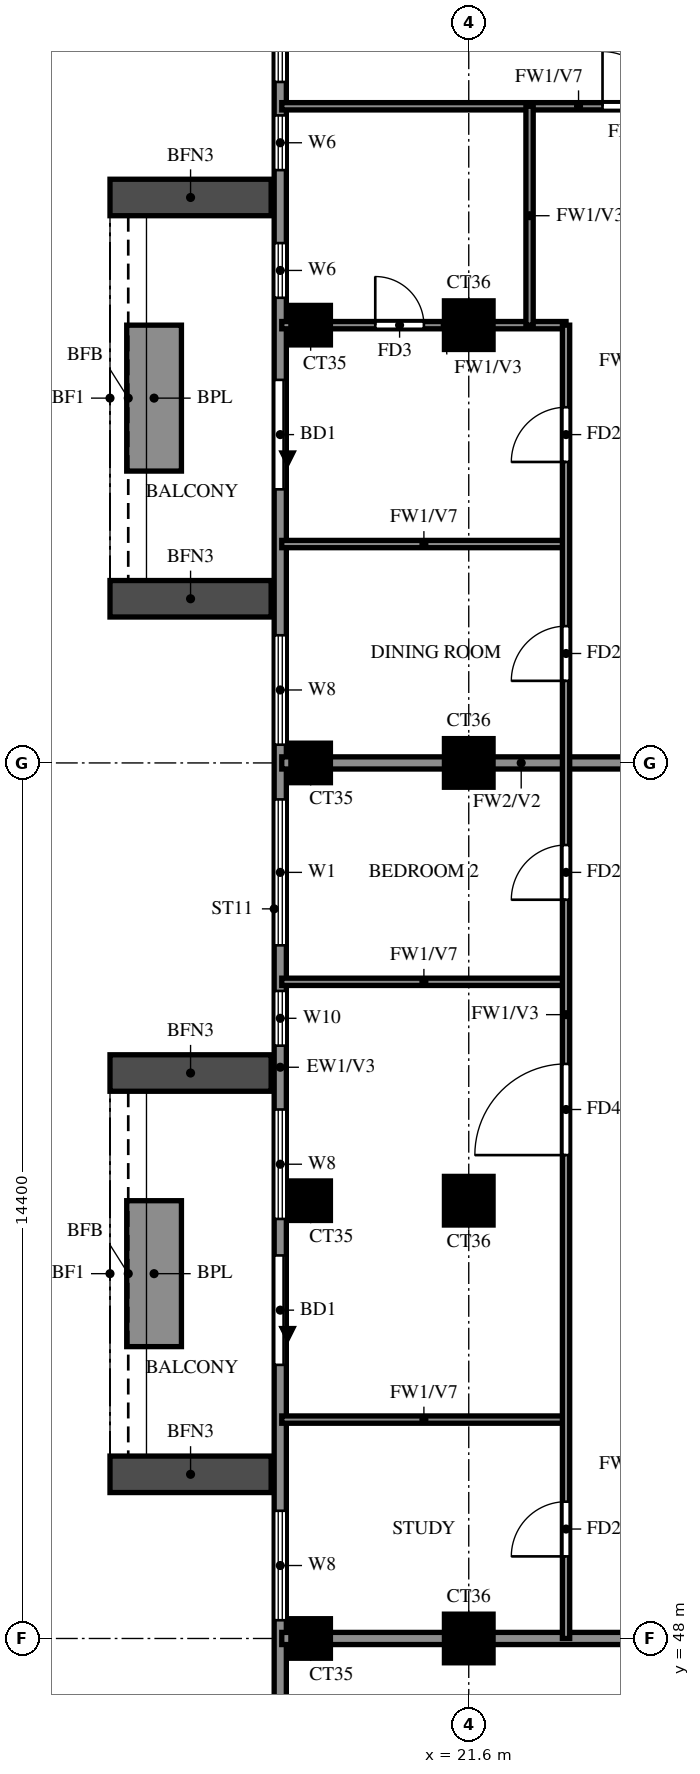
"""IFC4 building model, lengths in metres.
Left out: names, types, materials, properties, quantities, classifications, styles, units other than length and angle.
Written with IfcOpenShell. Run it as: python <this file> out.ifc"""

import sys

from ifc_helpers import new_model, si_unit, direction, frame, frame_2d, origin, origin_2d, place, context, subcontext, project, spatial, rectangle, extrude, source, transform, mapped, element, fill, save


model = new_model("IFC4")
c1 = context("Model", 3, precision=1e-05, world=origin(), true_north=direction((0.0, 1.0)))
c2 = subcontext(c1, "Body", "Model", "MODEL_VIEW")
j1 = project(units=[si_unit("LENGTHUNIT", "METRE"), si_unit("PLANEANGLEUNIT", "RADIAN")], contexts=[c1])
p1 = place(None, origin())
s1 = spatial("IfcSite", under=j1, at=p1, CompositionType="ELEMENT")
p2 = place(p1, origin())
s2 = spatial("IfcBuilding", under=s1, at=p2, CompositionType="ELEMENT")
p3 = place(p2, frame((0.0, 0.0, 243.0)))
s3 = spatial("IfcBuildingStorey", under=s2, at=p3, CompositionType="ELEMENT", Elevation=243.0)
m1 = source(origin(), c2, "Body", "SweptSolid", [
    extrude(rectangle(XDim=0.65, YDim=0.65, at=origin_2d()), origin(), (0.0, 0.0, 1.0), 3.22),
])
p4 = place(p3, frame((19.0, 48.0, 0.0), z_axis=(0.0, 0.0, 1.0), x_axis=(1.0, 0.0, 0.0)))
e1 = element("IfcColumn", 1, at=p4, inside=s3, PredefinedType="COLUMN", context=c2, shape_type="MappedRepresentation", body=[
    mapped(m1, transform((0.0, 0.0, 0.0))),
])
m2 = source(origin(), c2, "Body", "SweptSolid", [
    extrude(rectangle(XDim=0.8, YDim=0.8, at=origin_2d()), origin(), (0.0, 0.0, 1.0), 3.22),
])
p5 = place(p3, frame((21.6, 48.0, 0.0), z_axis=(0.0, 0.0, 1.0), x_axis=(1.0, 0.0, 0.0)))
e2 = element("IfcColumn", 2, at=p5, inside=s3, PredefinedType="COLUMN", context=c2, shape_type="MappedRepresentation", body=[
    mapped(m2, transform((0.0, 0.0, 0.0))),
])
p6 = place(p3, frame((19.0, 55.2, 0.0), z_axis=(0.0, 0.0, 1.0), x_axis=(1.0, 0.0, 0.0)))
e3 = element("IfcColumn", 3, at=p6, inside=s3, PredefinedType="COLUMN", context=c2, shape_type="MappedRepresentation", body=[
    mapped(m1, transform((0.0, 0.0, 0.0))),
])
p7 = place(p3, frame((21.6, 55.2, 0.0), z_axis=(0.0, 0.0, 1.0), x_axis=(1.0, 0.0, 0.0)))
e4 = element("IfcColumn", 4, at=p7, inside=s3, PredefinedType="COLUMN", context=c2, shape_type="MappedRepresentation", body=[
    mapped(m2, transform((0.0, 0.0, 0.0))),
])
p8 = place(p3, frame((19.0, 62.4, 0.0), z_axis=(0.0, 0.0, 1.0), x_axis=(1.0, 0.0, 0.0)))
e5 = element("IfcColumn", 5, at=p8, inside=s3, PredefinedType="COLUMN", context=c2, shape_type="MappedRepresentation", body=[
    mapped(m1, transform((0.0, 0.0, 0.0))),
])
p9 = place(p3, frame((21.6, 62.4, 0.0), z_axis=(0.0, 0.0, 1.0), x_axis=(1.0, 0.0, 0.0)))
e6 = element("IfcColumn", 6, at=p9, inside=s3, PredefinedType="COLUMN", context=c2, shape_type="MappedRepresentation", body=[
    mapped(m2, transform((0.0, 0.0, 0.0))),
])
p10 = place(p3, frame((19.0, 69.6, 0.0), z_axis=(0.0, 0.0, 1.0), x_axis=(1.0, 0.0, 0.0)))
e7 = element("IfcColumn", 7, at=p10, inside=s3, PredefinedType="COLUMN", context=c2, shape_type="MappedRepresentation", body=[
    mapped(m1, transform((0.0, 0.0, 0.0))),
])
p11 = place(p3, frame((21.6, 69.6, 0.0), z_axis=(0.0, 0.0, 1.0), x_axis=(1.0, 0.0, 0.0)))
e8 = element("IfcColumn", 8, at=p11, inside=s3, PredefinedType="COLUMN", context=c2, shape_type="MappedRepresentation", body=[
    mapped(m2, transform((0.0, 0.0, 0.0))),
])
p12 = place(p3, frame((18.5, 76.6, 0.0), z_axis=(0.0, 0.0, 1.0), x_axis=(0.0, -1.0, 0.0)))
e9 = element("IfcWall", 9, at=p12, inside=s3, PredefinedType="SOLIDWALL", context=c2, shape_type="SweptSolid", body=[
    extrude(rectangle(XDim=33.4, YDim=0.2, at=frame_2d((16.7, 0.0))), origin(), (0.0, 0.0, 1.0), 3.22),
])
p13 = place(p12, frame((7.9, 0.0, 0.0)))
e10 = element("IfcOpeningElement", 10, at=p13, cuts=e9, PredefinedType="OPENING", context=c2, shape_type="SweptSolid", body=[
    extrude(rectangle(XDim=1.8, YDim=2.4, at=frame_2d((0.9, 1.2))), frame((0.0, 0.11, 0.0), z_axis=(0.0, -1.0, 0.0), x_axis=(1.0, 0.0, 0.0)), (0.0, 0.0, 1.0), 0.22),
])
p14 = place(p12, frame((22.3, 0.0, 0.0)))
e11 = element("IfcOpeningElement", 11, at=p14, cuts=e9, PredefinedType="OPENING", context=c2, shape_type="SweptSolid", body=[
    extrude(rectangle(XDim=1.8, YDim=2.4, at=frame_2d((0.9, 1.2))), frame((0.0, 0.11, 0.0), z_axis=(0.0, -1.0, 0.0), x_axis=(1.0, 0.0, 0.0)), (0.0, 0.0, 1.0), 0.22),
])
p15 = place(p12, frame((29.7, 0.0, 0.6)))
e12 = element("IfcOpeningElement", 12, at=p15, cuts=e9, PredefinedType="OPENING", context=c2, shape_type="SweptSolid", body=[
    extrude(rectangle(XDim=2.4, YDim=2.4, at=frame_2d((1.2, 1.2))), frame((0.0, 0.11, 0.0), z_axis=(0.0, -1.0, 0.0), x_axis=(1.0, 0.0, 0.0)), (0.0, 0.0, 1.0), 0.22),
])
p16 = place(p12, frame((26.5, 0.0, 0.6)))
e13 = element("IfcOpeningElement", 13, at=p16, cuts=e9, PredefinedType="OPENING", context=c2, shape_type="SweptSolid", body=[
    extrude(rectangle(XDim=1.8, YDim=2.4, at=frame_2d((0.9, 1.2))), frame((0.0, 0.11, 0.0), z_axis=(0.0, -1.0, 0.0), x_axis=(1.0, 0.0, 0.0)), (0.0, 0.0, 1.0), 0.22),
])
p17 = place(p12, frame((17.95, 0.0, 0.6)))
e14 = element("IfcOpeningElement", 14, at=p17, cuts=e9, PredefinedType="OPENING", context=c2, shape_type="SweptSolid", body=[
    extrude(rectangle(XDim=0.9, YDim=2.4, at=frame_2d((0.45, 1.2))), frame((0.0, 0.11, 0.0), z_axis=(0.0, -1.0, 0.0), x_axis=(1.0, 0.0, 0.0)), (0.0, 0.0, 1.0), 0.22),
])
p18 = place(p12, frame((19.9, 0.0, 0.6)))
e15 = element("IfcOpeningElement", 15, at=p18, cuts=e9, PredefinedType="OPENING", context=c2, shape_type="SweptSolid", body=[
    extrude(rectangle(XDim=1.8, YDim=2.4, at=frame_2d((0.9, 1.2))), frame((0.0, 0.11, 0.0), z_axis=(0.0, -1.0, 0.0), x_axis=(1.0, 0.0, 0.0)), (0.0, 0.0, 1.0), 0.22),
])
p19 = place(p12, frame((14.8, 0.0, 0.6)))
e16 = element("IfcOpeningElement", 16, at=p19, cuts=e9, PredefinedType="OPENING", context=c2, shape_type="SweptSolid", body=[
    extrude(rectangle(XDim=2.4, YDim=2.4, at=frame_2d((1.2, 1.2))), frame((0.0, 0.11, 0.0), z_axis=(0.0, -1.0, 0.0), x_axis=(1.0, 0.0, 0.0)), (0.0, 0.0, 1.0), 0.22),
])
p20 = place(p12, frame((12.1, 0.0, 0.6)))
e17 = element("IfcOpeningElement", 17, at=p20, cuts=e9, PredefinedType="OPENING", context=c2, shape_type="SweptSolid", body=[
    extrude(rectangle(XDim=1.8, YDim=2.4, at=frame_2d((0.9, 1.2))), frame((0.0, 0.11, 0.0), z_axis=(0.0, -1.0, 0.0), x_axis=(1.0, 0.0, 0.0)), (0.0, 0.0, 1.0), 0.22),
])
p21 = place(p12, frame((3.55, 0.0, 1.5)))
e18 = element("IfcOpeningElement", 18, at=p21, cuts=e9, PredefinedType="OPENING", context=c2, shape_type="SweptSolid", body=[
    extrude(rectangle(XDim=0.9, YDim=0.9, at=frame_2d((0.45, 0.45))), frame((0.0, 0.11, 0.0), z_axis=(0.0, -1.0, 0.0), x_axis=(1.0, 0.0, 0.0)), (0.0, 0.0, 1.0), 0.22),
])
p22 = place(p12, frame((5.65, 0.0, 1.5)))
e19 = element("IfcOpeningElement", 19, at=p22, cuts=e9, PredefinedType="OPENING", context=c2, shape_type="SweptSolid", body=[
    extrude(rectangle(XDim=0.9, YDim=0.9, at=frame_2d((0.45, 0.45))), frame((0.0, 0.11, 0.0), z_axis=(0.0, -1.0, 0.0), x_axis=(1.0, 0.0, 0.0)), (0.0, 0.0, 1.0), 0.22),
])
p23 = place(p12, frame((0.6, 0.0, 0.6)))
e20 = element("IfcOpeningElement", 20, at=p23, cuts=e9, PredefinedType="OPENING", context=c2, shape_type="SweptSolid", body=[
    extrude(rectangle(XDim=2.4, YDim=2.4, at=frame_2d((1.2, 1.2))), frame((0.0, 0.11, 0.0), z_axis=(0.0, -1.0, 0.0), x_axis=(1.0, 0.0, 0.0)), (0.0, 0.0, 1.0), 0.22),
])
for number, where, z_axis, x_axis in (
    (21, (18.35, 71.7, 0.0), (0.0, 0.0, 1.0), (-1.0, 0.0, 0.0)),
    (22, (18.35, 65.1, 0.0), (0.0, 0.0, 1.0), (-1.0, 0.0, 0.0)),
):
    element("IfcWall", number, at=place(p3, frame(where, z_axis=z_axis, x_axis=x_axis)), inside=s3, PredefinedType="SOLIDWALL", context=c2, shape_type="SweptSolid", body=[
        extrude(rectangle(XDim=2.65, YDim=0.6, at=frame_2d((1.325, 0.0))), origin(), (0.0, 0.0, 1.0), 2.85),
    ])
p24 = place(p3, frame((16.425, 69.6, 0.0), z_axis=(0.0, 0.0, 1.0), x_axis=(0.0, -1.0, 0.0)))
e23 = element("IfcWall", 23, at=p24, inside=s3, PredefinedType="SOLIDWALL", context=c2, shape_type="SweptSolid", body=[
    extrude(rectangle(XDim=2.4, YDim=0.9, at=frame_2d((1.2, 0.0))), origin(), (0.0, 0.0, 1.0), 0.9),
])
for number, where, z_axis, x_axis in (
    (24, (18.35, 57.3, 0.0), (0.0, 0.0, 1.0), (-1.0, 0.0, 0.0)),
    (25, (18.35, 50.7, 0.0), (0.0, 0.0, 1.0), (-1.0, 0.0, 0.0)),
):
    element("IfcWall", number, at=place(p3, frame(where, z_axis=z_axis, x_axis=x_axis)), inside=s3, PredefinedType="SOLIDWALL", context=c2, shape_type="SweptSolid", body=[
        extrude(rectangle(XDim=2.65, YDim=0.6, at=frame_2d((1.325, 0.0))), origin(), (0.0, 0.0, 1.0), 2.85),
    ])
p25 = place(p3, frame((16.425, 55.2, 0.0), z_axis=(0.0, 0.0, 1.0), x_axis=(0.0, -1.0, 0.0)))
e26 = element("IfcWall", 26, at=p25, inside=s3, PredefinedType="SOLIDWALL", context=c2, shape_type="SweptSolid", body=[
    extrude(rectangle(XDim=2.4, YDim=0.9, at=frame_2d((1.2, 0.0))), origin(), (0.0, 0.0, 1.0), 0.9),
])
p26 = place(p3, frame((18.525, 48.0, 0.0), z_axis=(0.0, 0.0, 1.0), x_axis=(1.0, 0.0, 0.0)))
e27 = element("IfcWall", 27, at=p26, inside=s3, PredefinedType="SOLIDWALL", context=c2, shape_type="SweptSolid", body=[
    extrude(rectangle(XDim=15.075, YDim=0.2, at=frame_2d((7.538, 0.0))), origin(), (0.0, 0.0, 1.0), 3.22),
])
p27 = place(p3, frame((18.525, 62.4, 0.0), z_axis=(0.0, 0.0, 1.0), x_axis=(1.0, 0.0, 0.0)))
e28 = element("IfcWall", 28, at=p27, inside=s3, PredefinedType="SOLIDWALL", context=c2, shape_type="SweptSolid", body=[
    extrude(rectangle(XDim=7.875, YDim=0.2, at=frame_2d((3.938, 0.0))), origin(), (0.0, 0.0, 1.0), 3.22),
])
for number, where, z_axis, x_axis in (
    (29, (18.525, 51.6, 0.0), (0.0, 0.0, 1.0), (1.0, 0.0, 0.0)),
    (30, (18.525, 58.8, 0.0), (0.0, 0.0, 1.0), (1.0, 0.0, 0.0)),
    (31, (18.525, 66.0, 0.0), (0.0, 0.0, 1.0), (1.0, 0.0, 0.0)),
):
    element("IfcWall", number, at=place(p3, frame(where, z_axis=z_axis, x_axis=x_axis)), inside=s3, PredefinedType="PARTITIONING", context=c2, shape_type="SweptSolid", body=[
        extrude(rectangle(XDim=4.675, YDim=0.12, at=frame_2d((2.337, 0.0))), origin(), (0.0, 0.0, 1.0), 2.32),
    ])
p28 = place(p3, frame((18.525, 69.6, 0.0), z_axis=(0.0, 0.0, 1.0), x_axis=(1.0, 0.0, 0.0)))
e32 = element("IfcWall", 32, at=p28, inside=s3, PredefinedType="PARTITIONING", context=c2, shape_type="SweptSolid", body=[
    extrude(rectangle(XDim=4.675, YDim=0.12, at=frame_2d((2.337, 0.0))), origin(), (0.0, 0.0, 1.0), 3.22),
])
p29 = place(p28, frame((1.538, 0.0, 0.0)))
e33 = element("IfcOpeningElement", 33, at=p29, cuts=e32, PredefinedType="OPENING", context=c2, shape_type="SweptSolid", body=[
    extrude(rectangle(XDim=0.8, YDim=2.1, at=frame_2d((0.4, 1.05))), frame((0.0, 0.07, 0.0), z_axis=(0.0, -1.0, 0.0), x_axis=(1.0, 0.0, 0.0)), (0.0, 0.0, 1.0), 0.14),
])
p30 = place(p3, frame((18.525, 73.2, 0.0), z_axis=(0.0, 0.0, 1.0), x_axis=(1.0, 0.0, 0.0)))
e34 = element("IfcWall", 34, at=p30, inside=s3, PredefinedType="PARTITIONING", context=c2, shape_type="SweptSolid", body=[
    extrude(rectangle(XDim=10.275, YDim=0.12, at=frame_2d((5.138, 0.0))), origin(), (0.0, 0.0, 1.0), 2.32),
])
p31 = place(p30, frame((5.275, 0.0, 0.0)))
e35 = element("IfcOpeningElement", 35, at=p31, cuts=e34, PredefinedType="OPENING", context=c2, shape_type="SweptSolid", body=[
    extrude(rectangle(XDim=0.9, YDim=2.1, at=frame_2d((0.45, 1.05))), frame((0.0, 0.07, 0.0), z_axis=(0.0, -1.0, 0.0), x_axis=(1.0, 0.0, 0.0)), (0.0, 0.0, 1.0), 0.14),
])
p32 = place(p3, frame((22.6, 69.6, 0.0), z_axis=(0.0, 0.0, 1.0), x_axis=(0.0, 1.0, 0.0)))
e36 = element("IfcWall", 36, at=p32, inside=s3, PredefinedType="PARTITIONING", context=c2, shape_type="SweptSolid", body=[
    extrude(rectangle(XDim=3.6, YDim=0.12, at=frame_2d((1.8, 0.0))), origin(), (0.0, 0.0, 1.0), 3.22),
])
p33 = place(p3, frame((23.2, 48.0, 0.0), z_axis=(0.0, 0.0, 1.0), x_axis=(0.0, 1.0, 0.0)))
e37 = element("IfcWall", 37, at=p33, inside=s3, PredefinedType="PARTITIONING", context=c2, shape_type="SweptSolid", body=[
    extrude(rectangle(XDim=21.6, YDim=0.12, at=frame_2d((10.8, 0.0))), origin(), (0.0, 0.0, 1.0), 3.22),
])
p34 = place(p33, frame((1.35, 0.0, 0.0)))
e38 = element("IfcOpeningElement", 38, at=p34, cuts=e37, PredefinedType="OPENING", context=c2, shape_type="SweptSolid", body=[
    extrude(rectangle(XDim=0.9, YDim=2.1, at=frame_2d((0.45, 1.05))), frame((0.0, 0.07, 0.0), z_axis=(0.0, -1.0, 0.0), x_axis=(1.0, 0.0, 0.0)), (0.0, 0.0, 1.0), 0.14),
])
p35 = place(p33, frame((7.95, 0.0, 0.0)))
e39 = element("IfcOpeningElement", 39, at=p35, cuts=e37, PredefinedType="OPENING", context=c2, shape_type="SweptSolid", body=[
    extrude(rectangle(XDim=1.5, YDim=2.1, at=frame_2d((0.75, 1.05))), frame((0.0, 0.07, 0.0), z_axis=(0.0, -1.0, 0.0), x_axis=(1.0, 0.0, 0.0)), (0.0, 0.0, 1.0), 0.14),
])
p36 = place(p33, frame((12.15, 0.0, 0.0)))
e40 = element("IfcOpeningElement", 40, at=p36, cuts=e37, PredefinedType="OPENING", context=c2, shape_type="SweptSolid", body=[
    extrude(rectangle(XDim=0.9, YDim=2.1, at=frame_2d((0.45, 1.05))), frame((0.0, 0.07, 0.0), z_axis=(0.0, -1.0, 0.0), x_axis=(1.0, 0.0, 0.0)), (0.0, 0.0, 1.0), 0.14),
])
p37 = place(p33, frame((15.75, 0.0, 0.0)))
e41 = element("IfcOpeningElement", 41, at=p37, cuts=e37, PredefinedType="OPENING", context=c2, shape_type="SweptSolid", body=[
    extrude(rectangle(XDim=0.9, YDim=2.1, at=frame_2d((0.45, 1.05))), frame((0.0, 0.07, 0.0), z_axis=(0.0, -1.0, 0.0), x_axis=(1.0, 0.0, 0.0)), (0.0, 0.0, 1.0), 0.14),
])
p38 = place(p33, frame((19.35, 0.0, 0.0)))
e42 = element("IfcOpeningElement", 42, at=p38, cuts=e37, PredefinedType="OPENING", context=c2, shape_type="SweptSolid", body=[
    extrude(rectangle(XDim=0.9, YDim=2.1, at=frame_2d((0.45, 1.05))), frame((0.0, 0.07, 0.0), z_axis=(0.0, -1.0, 0.0), x_axis=(1.0, 0.0, 0.0)), (0.0, 0.0, 1.0), 0.14),
])
p39 = place(p13, origin())
e43 = element("IfcDoor", 43, at=p39, inside=s3, OperationType="DOUBLE_DOOR_SLIDING", PredefinedType="DOOR", context=c2, shape_type="SweptSolid", body=[
    extrude(rectangle(XDim=1.8, YDim=2.4, at=frame_2d((0.9, 1.2))), frame((0.0, 0.025, 0.0), z_axis=(0.0, -1.0, 0.0), x_axis=(1.0, 0.0, 0.0)), (0.0, 0.0, 1.0), 0.05),
])
fill(e10, e43)
p40 = place(p14, origin())
e44 = element("IfcDoor", 44, at=p40, inside=s3, OperationType="DOUBLE_DOOR_SLIDING", PredefinedType="DOOR", context=c2, shape_type="SweptSolid", body=[
    extrude(rectangle(XDim=1.8, YDim=2.4, at=frame_2d((0.9, 1.2))), frame((0.0, 0.025, 0.0), z_axis=(0.0, -1.0, 0.0), x_axis=(1.0, 0.0, 0.0)), (0.0, 0.0, 1.0), 0.05),
])
fill(e11, e44)
p41 = place(p16, origin())
e45 = element("IfcWindow", 45, at=p41, inside=s3, PartitioningType="DOUBLE_PANEL_VERTICAL", PredefinedType="WINDOW", context=c2, shape_type="SweptSolid", body=[
    extrude(rectangle(XDim=1.8, YDim=2.4, at=frame_2d((0.9, 1.2))), frame((0.0, 0.03, 0.0), z_axis=(0.0, -1.0, 0.0), x_axis=(1.0, 0.0, 0.0)), (0.0, 0.0, 1.0), 0.06),
])
fill(e13, e45)
p42 = place(p17, origin())
e46 = element("IfcWindow", 46, at=p42, inside=s3, PartitioningType="SINGLE_PANEL", PredefinedType="WINDOW", context=c2, shape_type="SweptSolid", body=[
    extrude(rectangle(XDim=0.9, YDim=2.4, at=frame_2d((0.45, 1.2))), frame((0.0, 0.03, 0.0), z_axis=(0.0, -1.0, 0.0), x_axis=(1.0, 0.0, 0.0)), (0.0, 0.0, 1.0), 0.06),
])
fill(e14, e46)
p43 = place(p18, origin())
e47 = element("IfcWindow", 47, at=p43, inside=s3, PartitioningType="DOUBLE_PANEL_VERTICAL", PredefinedType="WINDOW", context=c2, shape_type="SweptSolid", body=[
    extrude(rectangle(XDim=1.8, YDim=2.4, at=frame_2d((0.9, 1.2))), frame((0.0, 0.03, 0.0), z_axis=(0.0, -1.0, 0.0), x_axis=(1.0, 0.0, 0.0)), (0.0, 0.0, 1.0), 0.06),
])
fill(e15, e47)
p44 = place(p19, origin())
e48 = element("IfcWindow", 48, at=p44, inside=s3, PartitioningType="DOUBLE_PANEL_VERTICAL", PredefinedType="WINDOW", context=c2, shape_type="SweptSolid", body=[
    extrude(rectangle(XDim=2.4, YDim=2.4, at=frame_2d((1.2, 1.2))), frame((0.0, 0.03, 0.0), z_axis=(0.0, -1.0, 0.0), x_axis=(1.0, 0.0, 0.0)), (0.0, 0.0, 1.0), 0.06),
])
fill(e16, e48)
p45 = place(p20, origin())
e49 = element("IfcWindow", 49, at=p45, inside=s3, PartitioningType="DOUBLE_PANEL_VERTICAL", PredefinedType="WINDOW", context=c2, shape_type="SweptSolid", body=[
    extrude(rectangle(XDim=1.8, YDim=2.4, at=frame_2d((0.9, 1.2))), frame((0.0, 0.03, 0.0), z_axis=(0.0, -1.0, 0.0), x_axis=(1.0, 0.0, 0.0)), (0.0, 0.0, 1.0), 0.06),
])
fill(e17, e49)
p46 = place(p21, origin())
e50 = element("IfcWindow", 50, at=p46, inside=s3, PartitioningType="SINGLE_PANEL", PredefinedType="WINDOW", context=c2, shape_type="SweptSolid", body=[
    extrude(rectangle(XDim=0.9, YDim=0.9, at=frame_2d((0.45, 0.45))), frame((0.0, 0.03, 0.0), z_axis=(0.0, -1.0, 0.0), x_axis=(1.0, 0.0, 0.0)), (0.0, 0.0, 1.0), 0.06),
])
fill(e18, e50)
p47 = place(p22, origin())
e51 = element("IfcWindow", 51, at=p47, inside=s3, PartitioningType="SINGLE_PANEL", PredefinedType="WINDOW", context=c2, shape_type="SweptSolid", body=[
    extrude(rectangle(XDim=0.9, YDim=0.9, at=frame_2d((0.45, 0.45))), frame((0.0, 0.03, 0.0), z_axis=(0.0, -1.0, 0.0), x_axis=(1.0, 0.0, 0.0)), (0.0, 0.0, 1.0), 0.06),
])
fill(e19, e51)
p48 = place(p23, origin())
e52 = element("IfcWindow", 52, at=p48, inside=s3, PartitioningType="DOUBLE_PANEL_VERTICAL", PredefinedType="WINDOW", context=c2, shape_type="SweptSolid", body=[
    extrude(rectangle(XDim=2.4, YDim=2.4, at=frame_2d((1.2, 1.2))), frame((0.0, 0.03, 0.0), z_axis=(0.0, -1.0, 0.0), x_axis=(1.0, 0.0, 0.0)), (0.0, 0.0, 1.0), 0.06),
])
fill(e20, e52)
p49 = place(p34, origin())
e53 = element("IfcDoor", 53, at=p49, inside=s3, OperationType="SINGLE_SWING_LEFT", PredefinedType="DOOR", context=c2, shape_type="SweptSolid", body=[
    extrude(rectangle(XDim=0.9, YDim=2.1, at=frame_2d((0.45, 1.05))), frame((0.0, 0.025, 0.0), z_axis=(0.0, -1.0, 0.0), x_axis=(1.0, 0.0, 0.0)), (0.0, 0.0, 1.0), 0.05),
])
fill(e38, e53)
p50 = place(p35, origin())
e54 = element("IfcDoor", 54, at=p50, inside=s3, OperationType="SINGLE_SWING_RIGHT", PredefinedType="DOOR", context=c2, shape_type="SweptSolid", body=[
    extrude(rectangle(XDim=1.5, YDim=2.1, at=frame_2d((0.75, 1.05))), frame((0.0, 0.025, 0.0), z_axis=(0.0, -1.0, 0.0), x_axis=(1.0, 0.0, 0.0)), (0.0, 0.0, 1.0), 0.05),
])
fill(e39, e54)
p51 = place(p36, origin())
e55 = element("IfcDoor", 55, at=p51, inside=s3, OperationType="SINGLE_SWING_RIGHT", PredefinedType="DOOR", context=c2, shape_type="SweptSolid", body=[
    extrude(rectangle(XDim=0.9, YDim=2.1, at=frame_2d((0.45, 1.05))), frame((0.0, 0.025, 0.0), z_axis=(0.0, -1.0, 0.0), x_axis=(1.0, 0.0, 0.0)), (0.0, 0.0, 1.0), 0.05),
])
fill(e40, e55)
p52 = place(p37, origin())
e56 = element("IfcDoor", 56, at=p52, inside=s3, OperationType="SINGLE_SWING_LEFT", PredefinedType="DOOR", context=c2, shape_type="SweptSolid", body=[
    extrude(rectangle(XDim=0.9, YDim=2.1, at=frame_2d((0.45, 1.05))), frame((0.0, 0.025, 0.0), z_axis=(0.0, -1.0, 0.0), x_axis=(1.0, 0.0, 0.0)), (0.0, 0.0, 1.0), 0.05),
])
fill(e41, e56)
p53 = place(p38, origin())
e57 = element("IfcDoor", 57, at=p53, inside=s3, OperationType="SINGLE_SWING_RIGHT", PredefinedType="DOOR", context=c2, shape_type="SweptSolid", body=[
    extrude(rectangle(XDim=0.9, YDim=2.1, at=frame_2d((0.45, 1.05))), frame((0.0, 0.025, 0.0), z_axis=(0.0, -1.0, 0.0), x_axis=(1.0, 0.0, 0.0)), (0.0, 0.0, 1.0), 0.05),
])
fill(e42, e57)
p54 = place(p29, origin())
e58 = element("IfcDoor", 58, at=p54, inside=s3, OperationType="SINGLE_SWING_RIGHT", PredefinedType="DOOR", context=c2, shape_type="SweptSolid", body=[
    extrude(rectangle(XDim=0.8, YDim=2.1, at=frame_2d((0.4, 1.05))), frame((0.0, 0.025, 0.0), z_axis=(0.0, -1.0, 0.0), x_axis=(1.0, 0.0, 0.0)), (0.0, 0.0, 1.0), 0.05),
])
fill(e33, e58)
p55 = place(p31, origin())
e59 = element("IfcDoor", 59, at=p55, inside=s3, OperationType="SINGLE_SWING_LEFT", PredefinedType="DOOR", context=c2, shape_type="SweptSolid", body=[
    extrude(rectangle(XDim=0.9, YDim=2.1, at=frame_2d((0.45, 1.05))), frame((0.0, 0.025, 0.0), z_axis=(0.0, -1.0, 0.0), x_axis=(1.0, 0.0, 0.0)), (0.0, 0.0, 1.0), 0.05),
])
fill(e35, e59)
save(model, sys.argv[1])
